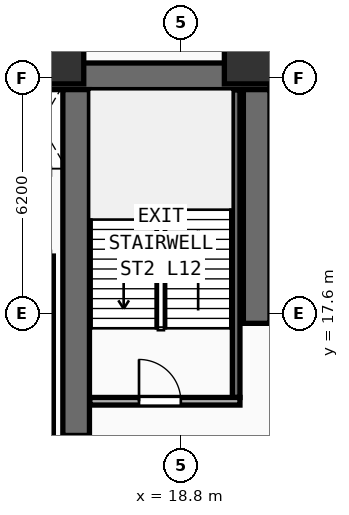
"""IFC4 building model, lengths in metres.
Left out: names, types, materials, properties, quantities, classifications, styles, units other than length and angle.
Written with IfcOpenShell. Run it as: python <this file> out.ifc"""

import sys

from ifc_helpers import new_model, si_unit, direction, frame, frame_2d, origin, origin_2d, place, context, subcontext, project, spatial, rectangle, extrude, element, fill, save


model = new_model("IFC4")
c1 = context("Model", 3, precision=1e-05, world=origin(), true_north=direction((0.0, 1.0)))
c2 = subcontext(c1, "Body", "Model", "MODEL_VIEW")
j1 = project(units=[si_unit("LENGTHUNIT", "METRE"), si_unit("PLANEANGLEUNIT", "RADIAN")], contexts=[c1])
p1 = place(None, origin())
s1 = spatial("IfcSite", under=j1, at=p1, CompositionType="ELEMENT")
p2 = place(p1, origin())
s2 = spatial("IfcBuilding", under=s1, at=p2, CompositionType="ELEMENT")
p3 = place(p2, frame((0.0, 0.0, 48.6)))
s3 = spatial("IfcBuildingStorey", under=s2, at=p3, CompositionType="ELEMENT", Elevation=48.6)
p4 = place(p3, frame((7.1, 23.85, 0.0), z_axis=(0.0, 0.0, 1.0), x_axis=(1.0, 0.0, 0.0)))
e1 = element("IfcWall", 1, at=p4, inside=s3, PredefinedType="SHEAR", context=c2, shape_type="SweptSolid", body=[
    extrude(rectangle(XDim=14.05, YDim=0.7, at=frame_2d((7.025, 0.0))), origin(), (0.0, 0.0, 1.0), 3.54),
])
p5 = place(p3, frame((20.8, 17.35, 0.0), z_axis=(0.0, 0.0, 1.0), x_axis=(0.0, 1.0, 0.0)))
e2 = element("IfcWall", 2, at=p5, inside=s3, PredefinedType="SHEAR", context=c2, shape_type="SweptSolid", body=[
    extrude(rectangle(XDim=6.15, YDim=0.7, at=frame_2d((3.075, 0.0))), origin(), (0.0, 0.0, 1.0), 3.54),
])
p6 = place(p3, frame((16.05, 14.4, 0.0), z_axis=(0.0, 0.0, 1.0), x_axis=(0.0, 1.0, 0.0)))
e3 = element("IfcWall", 3, at=p6, inside=s3, PredefinedType="SHEAR", context=c2, shape_type="SweptSolid", body=[
    extrude(rectangle(XDim=9.1, YDim=0.7, at=frame_2d((4.55, 0.0))), origin(), (0.0, 0.0, 1.0), 3.54),
])
for number, where, z_axis, x_axis in (
    (4, (15.45, 24.45, 0.0), (0.0, 0.0, 1.0), (1.0, 0.0, 0.0)),
    (5, (20.75, 24.45, 0.0), (0.0, 0.0, 1.0), (1.0, 0.0, 0.0)),
):
    element("IfcColumn", number, at=place(p3, frame(where, z_axis=z_axis, x_axis=x_axis)), inside=s3, PredefinedType="COLUMN", context=c2, shape_type="SweptSolid", body=[
        extrude(rectangle(XDim=1.6, YDim=1.6, at=origin_2d()), origin(), (0.0, 0.0, 1.0), 3.54),
    ])
p7 = place(p3, frame((20.26, 15.4, 0.0), z_axis=(0.0, 0.0, 1.0), x_axis=(0.0, 1.0, 0.0)))
e6 = element("IfcWall", 6, at=p7, inside=s3, PredefinedType="SHEAR", context=c2, shape_type="SweptSolid", body=[
    extrude(rectangle(XDim=8.09, YDim=0.2, at=frame_2d((4.045, 0.0))), origin(), (0.0, 0.0, 1.0), 3.54),
])
p8 = place(p3, frame((16.41, 15.3, 0.0), z_axis=(0.0, 0.0, 1.0), x_axis=(1.0, 0.0, 0.0)))
e7 = element("IfcWall", 7, at=p8, inside=s3, PredefinedType="PARTITIONING", context=c2, shape_type="SweptSolid", body=[
    extrude(rectangle(XDim=3.95, YDim=0.2, at=frame_2d((1.975, 0.0))), origin(), (0.0, 0.0, 1.0), 3.54),
])
p9 = place(p8, frame((1.294, 0.0, 0.0)))
e8 = element("IfcOpeningElement", 8, at=p9, cuts=e7, PredefinedType="OPENING", context=c2, shape_type="SweptSolid", body=[
    extrude(rectangle(XDim=1.1, YDim=2.2, at=frame_2d((0.55, 1.1))), frame((0.0, 0.11, 0.0), z_axis=(0.0, -1.0, 0.0), x_axis=(1.0, 0.0, 0.0)), (0.0, 0.0, 1.0), 0.22),
])
p10 = place(p3, frame((15.35, 14.22, 0.0), z_axis=(0.0, 0.0, 1.0), x_axis=(0.0, 1.0, 0.0)))
e9 = element("IfcWall", 9, at=p10, inside=s3, PredefinedType="PARTITIONING", context=c2, shape_type="SweptSolid", body=[
    extrude(rectangle(XDim=2.23, YDim=0.2, at=frame_2d((1.115, 0.0))), origin(), (0.0, 0.0, 1.0), 3.54),
])
p11 = place(p3, frame((15.35, 16.45, 0.0), z_axis=(0.0, 0.0, 1.0), x_axis=(0.0, 1.0, 0.0)))
e10 = element("IfcWall", 10, at=p11, inside=s3, PredefinedType="PARTITIONING", context=c2, shape_type="SweptSolid", body=[
    extrude(rectangle(XDim=2.67, YDim=0.2, at=frame_2d((1.335, 0.0))), origin(), (0.0, 0.0, 1.0), 3.54),
])
p12 = place(p9, origin())
e11 = element("IfcDoor", 11, at=p12, inside=s3, OperationType="SINGLE_SWING_LEFT", PredefinedType="DOOR", context=c2, shape_type="SweptSolid", body=[
    extrude(rectangle(XDim=1.1, YDim=2.2, at=frame_2d((0.55, 1.1))), frame((0.0, 0.025, 0.0), z_axis=(0.0, -1.0, 0.0), x_axis=(1.0, 0.0, 0.0)), (0.0, 0.0, 1.0), 0.05),
])
fill(e8, e11)
save(model, sys.argv[1])
